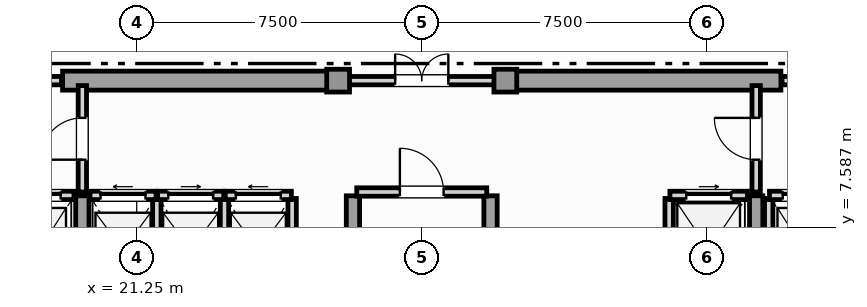
"""IFC4 building model, lengths in metres.
Left out: names, types, materials, properties, quantities, classifications, styles, units other than length and angle.
Written with IfcOpenShell. Run it as: python <this file> out.ifc"""

import sys

from ifc_helpers import new_model, si_unit, direction, frame, frame_2d, origin, origin_2d, place, context, subcontext, project, spatial, rectangle, extrude, element, fill, save


model = new_model("IFC4")
c1 = context("Model", 3, precision=1e-05, world=origin(), true_north=direction((0.0, 1.0)))
c2 = subcontext(c1, "Body", "Model", "MODEL_VIEW")
j1 = project(units=[si_unit("LENGTHUNIT", "METRE"), si_unit("PLANEANGLEUNIT", "RADIAN")], contexts=[c1])
p1 = place(None, origin())
s1 = spatial("IfcSite", under=j1, at=p1, CompositionType="ELEMENT")
p2 = place(p1, origin())
s2 = spatial("IfcBuilding", under=s1, at=p2, CompositionType="ELEMENT")
p3 = place(p2, frame((0.0, 0.0, 316.9)))
s3 = spatial("IfcBuildingStorey", under=s2, at=p3, CompositionType="ELEMENT", Elevation=316.9)
for number, where, z_axis, x_axis in (
    (1, (19.3, 11.45, 0.0), (0.0, 0.0, 1.0), (1.0, 0.0, 0.0)),
    (2, (30.9, 11.45, 0.0), (0.0, 0.0, 1.0), (1.0, 0.0, 0.0)),
):
    element("IfcWall", number, at=place(p3, frame(where, z_axis=z_axis, x_axis=x_axis)), inside=s3, PredefinedType="SHEAR", context=c2, shape_type="SweptSolid", body=[
        extrude(rectangle(XDim=7.3, YDim=0.5, at=frame_2d((3.65, 0.0))), origin(), (0.0, 0.0, 1.0), 3.65),
    ])
for number, where, z_axis, x_axis in (
    (3, (19.82, 0.92, 0.0), (0.0, 0.0, 1.0), (0.0, 1.0, 0.0)),
    (4, (26.94, 0.92, 0.0), (0.0, 0.0, 1.0), (0.0, 1.0, 0.0)),
    (5, (30.56, 0.92, 0.0), (0.0, 0.0, 1.0), (0.0, 1.0, 0.0)),
    (6, (37.55, 0.92, 0.0), (0.0, 0.0, 1.0), (0.0, 1.0, 0.0)),
):
    element("IfcWall", number, at=place(p3, frame(where, z_axis=z_axis, x_axis=x_axis)), inside=s3, PredefinedType="SHEAR", context=c2, shape_type="SweptSolid", body=[
        extrude(rectangle(XDim=7.5, YDim=0.35, at=frame_2d((3.75, 0.0))), origin(), (0.0, 0.0, 1.0), 3.65),
    ])
for number, where, z_axis, x_axis in (
    (7, (26.55, 11.45, 0.0), (0.0, 0.0, 1.0), (1.0, 0.0, 0.0)),
    (8, (30.95, 11.45, 0.0), (0.0, 0.0, 1.0), (1.0, 0.0, 0.0)),
):
    element("IfcColumn", number, at=place(p3, frame(where, z_axis=z_axis, x_axis=x_axis)), inside=s3, PredefinedType="COLUMN", context=c2, shape_type="SweptSolid", body=[
        extrude(rectangle(XDim=0.6, YDim=0.6, at=origin_2d()), origin(), (0.0, 0.0, 1.0), 3.85),
    ])
p4 = place(p3, frame((17.78, 8.43, 0.0), z_axis=(0.0, 0.0, 1.0), x_axis=(1.0, 0.0, 0.0)))
e9 = element("IfcWall", 9, at=p4, inside=s3, PredefinedType="SOLIDWALL", context=c2, shape_type="SweptSolid", body=[
    extrude(rectangle(XDim=1.82, YDim=0.22, at=frame_2d((0.91, 0.0))), origin(), (0.0, 0.0, 1.0), 3.65),
])
p5 = place(p4, frame((0.35, 0.0, 0.0)))
e10 = element("IfcOpeningElement", 10, at=p5, cuts=e9, PredefinedType="OPENING", context=c2, shape_type="SweptSolid", body=[
    extrude(rectangle(XDim=1.12, YDim=2.25, at=frame_2d((0.56, 1.125))), frame((0.0, 0.12, 0.0), z_axis=(0.0, -1.0, 0.0), x_axis=(1.0, 0.0, 0.0)), (0.0, 0.0, 1.0), 0.24),
])
p6 = place(p3, frame((37.88, 5.65, 0.0), z_axis=(0.0, 0.0, 1.0), x_axis=(0.0, 1.0, 0.0)))
e11 = element("IfcWall", 11, at=p6, inside=s3, PredefinedType="SOLIDWALL", context=c2, shape_type="SweptSolid", body=[
    extrude(rectangle(XDim=2.7, YDim=0.22, at=frame_2d((1.35, 0.0))), origin(), (0.0, 0.0, 1.0), 3.65),
])
p7 = place(p3, frame((37.9, 8.43, 0.0), z_axis=(0.0, 0.0, 1.0), x_axis=(1.0, 0.0, 0.0)))
e12 = element("IfcWall", 12, at=p7, inside=s3, PredefinedType="SOLIDWALL", context=c2, shape_type="SweptSolid", body=[
    extrude(rectangle(XDim=1.82, YDim=0.22, at=frame_2d((0.91, 0.0))), origin(), (0.0, 0.0, 1.0), 3.65),
])
p8 = place(p7, frame((0.35, 0.0, 0.0)))
e13 = element("IfcOpeningElement", 13, at=p8, cuts=e12, PredefinedType="OPENING", context=c2, shape_type="SweptSolid", body=[
    extrude(rectangle(XDim=1.12, YDim=2.25, at=frame_2d((0.56, 1.125))), frame((0.0, 0.12, 0.0), z_axis=(0.0, -1.0, 0.0), x_axis=(1.0, 0.0, 0.0)), (0.0, 0.0, 1.0), 0.24),
])
p9 = place(p3, frame((35.26, 5.65, 0.0), z_axis=(0.0, 0.0, 1.0), x_axis=(0.0, 1.0, 0.0)))
e14 = element("IfcWall", 14, at=p9, inside=s3, PredefinedType="SOLIDWALL", context=c2, shape_type="SweptSolid", body=[
    extrude(rectangle(XDim=2.7, YDim=0.22, at=frame_2d((1.35, 0.0))), origin(), (0.0, 0.0, 1.0), 3.65),
])
p10 = place(p3, frame((35.28, 8.43, 0.0), z_axis=(0.0, 0.0, 1.0), x_axis=(1.0, 0.0, 0.0)))
e15 = element("IfcWall", 15, at=p10, inside=s3, PredefinedType="SOLIDWALL", context=c2, shape_type="SweptSolid", body=[
    extrude(rectangle(XDim=2.04, YDim=0.22, at=frame_2d((1.02, 0.0))), origin(), (0.0, 0.0, 1.0), 3.65),
])
p11 = place(p10, frame((0.43, 0.0, 0.0)))
e16 = element("IfcOpeningElement", 16, at=p11, cuts=e15, PredefinedType="OPENING", context=c2, shape_type="SweptSolid", body=[
    extrude(rectangle(XDim=1.18, YDim=2.2, at=frame_2d((0.59, 1.1))), frame((0.0, 0.12, 0.0), z_axis=(0.0, -1.0, 0.0), x_axis=(1.0, 0.0, 0.0)), (0.0, 0.0, 1.0), 0.24),
])
p12 = place(p3, frame((21.78, 5.65, 0.0), z_axis=(0.0, 0.0, 1.0), x_axis=(0.0, 1.0, 0.0)))
e17 = element("IfcWall", 17, at=p12, inside=s3, PredefinedType="SOLIDWALL", context=c2, shape_type="SweptSolid", body=[
    extrude(rectangle(XDim=2.7, YDim=0.22, at=frame_2d((1.35, 0.0))), origin(), (0.0, 0.0, 1.0), 3.65),
])
p13 = place(p3, frame((20.02, 8.43, 0.0), z_axis=(0.0, 0.0, 1.0), x_axis=(1.0, 0.0, 0.0)))
e18 = element("IfcWall", 18, at=p13, inside=s3, PredefinedType="SOLIDWALL", context=c2, shape_type="SweptSolid", body=[
    extrude(rectangle(XDim=1.74, YDim=0.22, at=frame_2d((0.87, 0.0))), origin(), (0.0, 0.0, 1.0), 3.65),
])
p14 = place(p13, frame((0.28, 0.0, 0.0)))
e19 = element("IfcOpeningElement", 19, at=p14, cuts=e18, PredefinedType="OPENING", context=c2, shape_type="SweptSolid", body=[
    extrude(rectangle(XDim=1.18, YDim=2.2, at=frame_2d((0.59, 1.1))), frame((0.0, 0.12, 0.0), z_axis=(0.0, -1.0, 0.0), x_axis=(1.0, 0.0, 0.0)), (0.0, 0.0, 1.0), 0.24),
])
p15 = place(p3, frame((23.56, 5.65, 0.0), z_axis=(0.0, 0.0, 1.0), x_axis=(0.0, 1.0, 0.0)))
e20 = element("IfcWall", 20, at=p15, inside=s3, PredefinedType="SOLIDWALL", context=c2, shape_type="SweptSolid", body=[
    extrude(rectangle(XDim=2.7, YDim=0.22, at=frame_2d((1.35, 0.0))), origin(), (0.0, 0.0, 1.0), 3.65),
])
p16 = place(p3, frame((21.8, 8.43, 0.0), z_axis=(0.0, 0.0, 1.0), x_axis=(1.0, 0.0, 0.0)))
e21 = element("IfcWall", 21, at=p16, inside=s3, PredefinedType="SOLIDWALL", context=c2, shape_type="SweptSolid", body=[
    extrude(rectangle(XDim=1.74, YDim=0.22, at=frame_2d((0.87, 0.0))), origin(), (0.0, 0.0, 1.0), 3.65),
])
p17 = place(p16, frame((0.28, 0.0, 0.0)))
e22 = element("IfcOpeningElement", 22, at=p17, cuts=e21, PredefinedType="OPENING", context=c2, shape_type="SweptSolid", body=[
    extrude(rectangle(XDim=1.18, YDim=2.2, at=frame_2d((0.59, 1.1))), frame((0.0, 0.12, 0.0), z_axis=(0.0, -1.0, 0.0), x_axis=(1.0, 0.0, 0.0)), (0.0, 0.0, 1.0), 0.24),
])
p18 = place(p3, frame((25.34, 5.65, 0.0), z_axis=(0.0, 0.0, 1.0), x_axis=(0.0, 1.0, 0.0)))
e23 = element("IfcWall", 23, at=p18, inside=s3, PredefinedType="SOLIDWALL", context=c2, shape_type="SweptSolid", body=[
    extrude(rectangle(XDim=2.7, YDim=0.22, at=frame_2d((1.35, 0.0))), origin(), (0.0, 0.0, 1.0), 3.65),
])
p19 = place(p3, frame((23.58, 8.43, 0.0), z_axis=(0.0, 0.0, 1.0), x_axis=(1.0, 0.0, 0.0)))
e24 = element("IfcWall", 24, at=p19, inside=s3, PredefinedType="SOLIDWALL", context=c2, shape_type="SweptSolid", body=[
    extrude(rectangle(XDim=1.74, YDim=0.22, at=frame_2d((0.87, 0.0))), origin(), (0.0, 0.0, 1.0), 3.65),
])
p20 = place(p19, frame((0.28, 0.0, 0.0)))
e25 = element("IfcOpeningElement", 25, at=p20, cuts=e24, PredefinedType="OPENING", context=c2, shape_type="SweptSolid", body=[
    extrude(rectangle(XDim=1.18, YDim=2.2, at=frame_2d((0.59, 1.1))), frame((0.0, 0.12, 0.0), z_axis=(0.0, -1.0, 0.0), x_axis=(1.0, 0.0, 0.0)), (0.0, 0.0, 1.0), 0.24),
])
p21 = place(p3, frame((27.04, 8.52, 0.0), z_axis=(0.0, 0.0, 1.0), x_axis=(1.0, 0.0, 0.0)))
e26 = element("IfcWall", 26, at=p21, inside=s3, PredefinedType="SOLIDWALL", context=c2, shape_type="SweptSolid", body=[
    extrude(rectangle(XDim=3.42, YDim=0.22, at=frame_2d((1.71, 0.0))), origin(), (0.0, 0.0, 1.0), 3.65),
])
p22 = place(p21, frame((1.135, 0.0, 0.0)))
e27 = element("IfcOpeningElement", 27, at=p22, cuts=e26, PredefinedType="OPENING", context=c2, shape_type="SweptSolid", body=[
    extrude(rectangle(XDim=1.15, YDim=2.2, at=frame_2d((0.575, 1.1))), frame((0.0, 0.12, 0.0), z_axis=(0.0, -1.0, 0.0), x_axis=(1.0, 0.0, 0.0)), (0.0, 0.0, 1.0), 0.24),
])
p23 = place(p3, frame((19.82, 8.52, 0.0), z_axis=(0.0, 0.0, 1.0), x_axis=(0.0, 1.0, 0.0)))
e28 = element("IfcWall", 28, at=p23, inside=s3, PredefinedType="SOLIDWALL", context=c2, shape_type="SweptSolid", body=[
    extrude(rectangle(XDim=2.8, YDim=0.22, at=frame_2d((1.4, 0.0))), origin(), (0.0, 0.0, 1.0), 3.106),
])
p24 = place(p23, frame((0.85, 0.0, 0.0)))
e29 = element("IfcOpeningElement", 29, at=p24, cuts=e28, PredefinedType="OPENING", context=c2, shape_type="SweptSolid", body=[
    extrude(rectangle(XDim=1.1, YDim=2.2, at=frame_2d((0.55, 1.1))), frame((0.0, 0.12, 0.0), z_axis=(0.0, -1.0, 0.0), x_axis=(1.0, 0.0, 0.0)), (0.0, 0.0, 1.0), 0.24),
])
p25 = place(p3, frame((37.55, 8.52, 0.0), z_axis=(0.0, 0.0, 1.0), x_axis=(0.0, 1.0, 0.0)))
e30 = element("IfcWall", 30, at=p25, inside=s3, PredefinedType="SOLIDWALL", context=c2, shape_type="SweptSolid", body=[
    extrude(rectangle(XDim=2.8, YDim=0.22, at=frame_2d((1.4, 0.0))), origin(), (0.0, 0.0, 1.0), 3.106),
])
p26 = place(p25, frame((0.85, 0.0, 0.0)))
e31 = element("IfcOpeningElement", 31, at=p26, cuts=e30, PredefinedType="OPENING", context=c2, shape_type="SweptSolid", body=[
    extrude(rectangle(XDim=1.1, YDim=2.2, at=frame_2d((0.55, 1.1))), frame((0.0, 0.12, 0.0), z_axis=(0.0, -1.0, 0.0), x_axis=(1.0, 0.0, 0.0)), (0.0, 0.0, 1.0), 0.24),
])
p27 = place(p3, frame((16.23, 11.45, 0.0), z_axis=(0.0, 0.0, 1.0), x_axis=(1.0, 0.0, 0.0)))
e32 = element("IfcWall", 32, at=p27, inside=s3, PredefinedType="SOLIDWALL", context=c2, shape_type="SweptSolid", body=[
    extrude(rectangle(XDim=3.04, YDim=0.22, at=frame_2d((1.52, 0.0))), origin(), (0.0, 0.0, 1.0), 3.65),
])
p28 = place(p27, frame((0.97, 0.0, 0.0)))
e33 = element("IfcOpeningElement", 33, at=p28, cuts=e32, PredefinedType="OPENING", context=c2, shape_type="SweptSolid", body=[
    extrude(rectangle(XDim=1.1, YDim=2.2, at=frame_2d((0.55, 1.1))), frame((0.0, 0.12, 0.0), z_axis=(0.0, -1.0, 0.0), x_axis=(1.0, 0.0, 0.0)), (0.0, 0.0, 1.0), 0.24),
])
p29 = place(p3, frame((26.63, 11.45, 0.0), z_axis=(0.0, 0.0, 1.0), x_axis=(1.0, 0.0, 0.0)))
e34 = element("IfcWall", 34, at=p29, inside=s3, PredefinedType="SOLIDWALL", context=c2, shape_type="SweptSolid", body=[
    extrude(rectangle(XDim=4.24, YDim=0.22, at=frame_2d((2.12, 0.0))), origin(), (0.0, 0.0, 1.0), 3.65),
])
p30 = place(p29, frame((1.42, 0.0, 0.0)))
e35 = element("IfcOpeningElement", 35, at=p30, cuts=e34, PredefinedType="OPENING", context=c2, shape_type="SweptSolid", body=[
    extrude(rectangle(XDim=1.4, YDim=2.2, at=frame_2d((0.7, 1.1))), frame((0.0, 0.12, 0.0), z_axis=(0.0, -1.0, 0.0), x_axis=(1.0, 0.0, 0.0)), (0.0, 0.0, 1.0), 0.24),
])
p31 = place(p3, frame((38.23, 11.45, 0.0), z_axis=(0.0, 0.0, 1.0), x_axis=(1.0, 0.0, 0.0)))
e36 = element("IfcWall", 36, at=p31, inside=s3, PredefinedType="SOLIDWALL", context=c2, shape_type="SweptSolid", body=[
    extrude(rectangle(XDim=3.04, YDim=0.22, at=frame_2d((1.52, 0.0))), origin(), (0.0, 0.0, 1.0), 3.65),
])
p32 = place(p31, frame((0.97, 0.0, 0.0)))
e37 = element("IfcOpeningElement", 37, at=p32, cuts=e36, PredefinedType="OPENING", context=c2, shape_type="SweptSolid", body=[
    extrude(rectangle(XDim=1.1, YDim=2.2, at=frame_2d((0.55, 1.1))), frame((0.0, 0.12, 0.0), z_axis=(0.0, -1.0, 0.0), x_axis=(1.0, 0.0, 0.0)), (0.0, 0.0, 1.0), 0.24),
])
p33 = place(p5, origin())
e38 = element("IfcDoor", 38, at=p33, inside=s3, OperationType="SLIDING_TO_RIGHT", PredefinedType="DOOR", context=c2, shape_type="SweptSolid", body=[
    extrude(rectangle(XDim=1.12, YDim=2.25, at=frame_2d((0.56, 1.125))), frame((0.0, 0.025, 0.0), z_axis=(0.0, -1.0, 0.0), x_axis=(1.0, 0.0, 0.0)), (0.0, 0.0, 1.0), 0.05),
])
fill(e10, e38)
p34 = place(p8, origin())
e39 = element("IfcDoor", 39, at=p34, inside=s3, OperationType="SLIDING_TO_LEFT", PredefinedType="DOOR", context=c2, shape_type="SweptSolid", body=[
    extrude(rectangle(XDim=1.12, YDim=2.25, at=frame_2d((0.56, 1.125))), frame((0.0, 0.025, 0.0), z_axis=(0.0, -1.0, 0.0), x_axis=(1.0, 0.0, 0.0)), (0.0, 0.0, 1.0), 0.05),
])
fill(e13, e39)
p35 = place(p11, origin())
e40 = element("IfcDoor", 40, at=p35, inside=s3, OperationType="SLIDING_TO_RIGHT", PredefinedType="DOOR", context=c2, shape_type="SweptSolid", body=[
    extrude(rectangle(XDim=1.18, YDim=2.2, at=frame_2d((0.59, 1.1))), frame((0.0, 0.025, 0.0), z_axis=(0.0, -1.0, 0.0), x_axis=(1.0, 0.0, 0.0)), (0.0, 0.0, 1.0), 0.05),
])
fill(e16, e40)
p36 = place(p14, origin())
e41 = element("IfcDoor", 41, at=p36, inside=s3, OperationType="SLIDING_TO_LEFT", PredefinedType="DOOR", context=c2, shape_type="SweptSolid", body=[
    extrude(rectangle(XDim=1.18, YDim=2.2, at=frame_2d((0.59, 1.1))), frame((0.0, 0.025, 0.0), z_axis=(0.0, -1.0, 0.0), x_axis=(1.0, 0.0, 0.0)), (0.0, 0.0, 1.0), 0.05),
])
fill(e19, e41)
p37 = place(p17, origin())
e42 = element("IfcDoor", 42, at=p37, inside=s3, OperationType="SLIDING_TO_RIGHT", PredefinedType="DOOR", context=c2, shape_type="SweptSolid", body=[
    extrude(rectangle(XDim=1.18, YDim=2.2, at=frame_2d((0.59, 1.1))), frame((0.0, 0.025, 0.0), z_axis=(0.0, -1.0, 0.0), x_axis=(1.0, 0.0, 0.0)), (0.0, 0.0, 1.0), 0.05),
])
fill(e22, e42)
p38 = place(p20, origin())
e43 = element("IfcDoor", 43, at=p38, inside=s3, OperationType="SLIDING_TO_LEFT", PredefinedType="DOOR", context=c2, shape_type="SweptSolid", body=[
    extrude(rectangle(XDim=1.18, YDim=2.2, at=frame_2d((0.59, 1.1))), frame((0.0, 0.025, 0.0), z_axis=(0.0, -1.0, 0.0), x_axis=(1.0, 0.0, 0.0)), (0.0, 0.0, 1.0), 0.05),
])
fill(e25, e43)
p39 = place(p22, origin())
e44 = element("IfcDoor", 44, at=p39, inside=s3, OperationType="SINGLE_SWING_LEFT", PredefinedType="DOOR", context=c2, shape_type="SweptSolid", body=[
    extrude(rectangle(XDim=1.15, YDim=2.2, at=frame_2d((0.575, 1.1))), frame((0.0, 0.025, 0.0), z_axis=(0.0, -1.0, 0.0), x_axis=(1.0, 0.0, 0.0)), (0.0, 0.0, 1.0), 0.05),
])
fill(e27, e44)
p40 = place(p24, origin())
e45 = element("IfcDoor", 45, at=p40, inside=s3, OperationType="SINGLE_SWING_LEFT", PredefinedType="DOOR", context=c2, shape_type="SweptSolid", body=[
    extrude(rectangle(XDim=1.1, YDim=2.2, at=frame_2d((0.55, 1.1))), frame((0.0, 0.025, 0.0), z_axis=(0.0, -1.0, 0.0), x_axis=(1.0, 0.0, 0.0)), (0.0, 0.0, 1.0), 0.05),
])
fill(e29, e45)
p41 = place(p26, origin())
e46 = element("IfcDoor", 46, at=p41, inside=s3, OperationType="SINGLE_SWING_RIGHT", PredefinedType="DOOR", context=c2, shape_type="SweptSolid", body=[
    extrude(rectangle(XDim=1.1, YDim=2.2, at=frame_2d((0.55, 1.1))), frame((0.0, 0.025, 0.0), z_axis=(0.0, -1.0, 0.0), x_axis=(1.0, 0.0, 0.0)), (0.0, 0.0, 1.0), 0.05),
])
fill(e31, e46)
p42 = place(p30, origin())
e47 = element("IfcDoor", 47, at=p42, inside=s3, OperationType="DOUBLE_DOOR_SINGLE_SWING", PredefinedType="DOOR", context=c2, shape_type="SweptSolid", body=[
    extrude(rectangle(XDim=1.4, YDim=2.2, at=frame_2d((0.7, 1.1))), frame((0.0, 0.025, 0.0), z_axis=(0.0, -1.0, 0.0), x_axis=(1.0, 0.0, 0.0)), (0.0, 0.0, 1.0), 0.05),
])
fill(e35, e47)
save(model, sys.argv[1])
